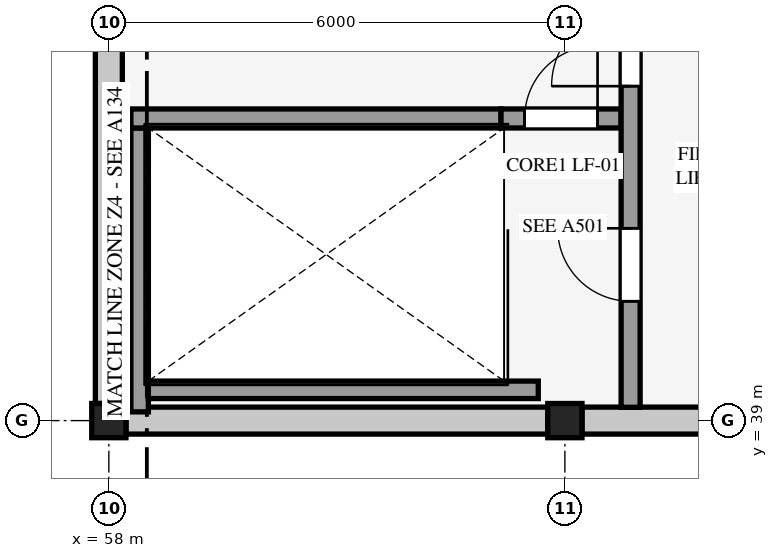
"""IFC4 building model, lengths in metres.
Left out: names, types, materials, properties, quantities, classifications, styles, units other than length and angle.
Written with IfcOpenShell. Run it as: python <this file> out.ifc"""

import sys

from ifc_helpers import new_model, si_unit, direction, frame, frame_2d, origin, origin_2d, place, context, subcontext, project, spatial, rectangle, extrude, element, fill, save


model = new_model("IFC4")
c1 = context("Model", 3, precision=1e-05, world=origin(), true_north=direction((0.0, 1.0)))
c2 = subcontext(c1, "Body", "Model", "MODEL_VIEW")
j1 = project(units=[si_unit("LENGTHUNIT", "METRE"), si_unit("PLANEANGLEUNIT", "RADIAN")], contexts=[c1])
p1 = place(None, origin())
s1 = spatial("IfcSite", under=j1, at=p1, CompositionType="ELEMENT")
p2 = place(p1, origin())
s2 = spatial("IfcBuilding", under=s1, at=p2, CompositionType="ELEMENT")
p3 = place(p2, frame((0.0, 0.0, 18.0)))
s3 = spatial("IfcBuildingStorey", under=s2, at=p3, CompositionType="ELEMENT", Elevation=18.0)
for number, where, z_axis, x_axis in (
    (1, (58.0, 39.0, 0.0), (0.0, 0.0, 1.0), (1.0, 0.0, 0.0)),
    (2, (64.0, 39.0, 0.0), (0.0, 0.0, 1.0), (1.0, 0.0, 0.0)),
):
    element("IfcColumn", number, at=place(p3, frame(where, z_axis=z_axis, x_axis=x_axis)), inside=s3, PredefinedType="COLUMN", context=c2, shape_type="SweptSolid", body=[
        extrude(rectangle(XDim=0.45, YDim=0.45, at=origin_2d()), origin(), (0.0, 0.0, 1.0), 4.5),
    ])
p4 = place(p3, frame((63.775, 39.0, 0.0), z_axis=(0.0, 0.0, 1.0), x_axis=(-1.0, 0.0, 0.0)))
e3 = element("IfcWall", 3, at=p4, inside=s3, PredefinedType="SOLIDWALL", context=c2, shape_type="SweptSolid", body=[
    extrude(rectangle(XDim=5.55, YDim=0.355, at=frame_2d((2.775, 0.0))), origin(), (0.0, 0.0, 1.0), 4.194),
])
p5 = place(p3, frame((69.775, 39.0, 0.0), z_axis=(0.0, 0.0, 1.0), x_axis=(-1.0, 0.0, 0.0)))
e4 = element("IfcWall", 4, at=p5, inside=s3, PredefinedType="SOLIDWALL", context=c2, shape_type="SweptSolid", body=[
    extrude(rectangle(XDim=5.55, YDim=0.355, at=frame_2d((2.775, 0.0))), origin(), (0.0, 0.0, 1.0), 4.234),
])
p6 = place(p3, frame((58.0, 39.225, 0.0), z_axis=(0.0, 0.0, 1.0), x_axis=(0.0, 1.0, 0.0)))
e5 = element("IfcWall", 5, at=p6, inside=s3, PredefinedType="SOLIDWALL", context=c2, shape_type="SweptSolid", body=[
    extrude(rectangle(XDim=5.55, YDim=0.355, at=frame_2d((2.775, 0.0))), origin(), (0.0, 0.0, 1.0), 4.093),
])
p7 = place(p3, frame((58.405, 39.115, 0.0), z_axis=(0.0, 0.0, 1.0), x_axis=(0.0, 1.0, 0.0)))
e6 = element("IfcWall", 6, at=p7, inside=s3, PredefinedType="SHEAR", context=c2, shape_type="SweptSolid", body=[
    extrude(rectangle(XDim=3.735, YDim=0.23, at=frame_2d((1.868, 0.0))), origin(), (0.0, 0.0, 1.0), 4.5),
])
p8 = place(p3, frame((58.52, 39.405, 0.0), z_axis=(0.0, 0.0, 1.0), x_axis=(1.0, 0.0, 0.0)))
e7 = element("IfcWall", 7, at=p8, inside=s3, PredefinedType="SHEAR", context=c2, shape_type="SweptSolid", body=[
    extrude(rectangle(XDim=5.13, YDim=0.23, at=frame_2d((2.565, 0.0))), origin(), (0.0, 0.0, 1.0), 4.5),
])
p9 = place(p3, frame((58.29, 42.975, 0.0), z_axis=(0.0, 0.0, 1.0), x_axis=(1.0, 0.0, 0.0)))
e8 = element("IfcWall", 8, at=p9, inside=s3, PredefinedType="SHEAR", context=c2, shape_type="SweptSolid", body=[
    extrude(rectangle(XDim=4.87, YDim=0.25, at=frame_2d((2.435, 0.0))), origin(), (0.0, 0.0, 1.0), 4.5),
])
p10 = place(p3, frame((63.16, 42.975, 0.0), z_axis=(0.0, 0.0, 1.0), x_axis=(1.0, 0.0, 0.0)))
e9 = element("IfcWall", 9, at=p10, inside=s3, PredefinedType="SHEAR", context=c2, shape_type="SweptSolid", body=[
    extrude(rectangle(XDim=1.58, YDim=0.25, at=frame_2d((0.79, 0.0))), origin(), (0.0, 0.0, 1.0), 4.24),
])
p11 = place(p10, frame((0.31, 0.0, 0.0)))
e10 = element("IfcOpeningElement", 10, at=p11, cuts=e9, PredefinedType="OPENING", context=c2, shape_type="SweptSolid", body=[
    extrude(rectangle(XDim=0.96, YDim=2.12, at=frame_2d((0.48, 1.06))), frame((0.0, 0.135, 0.0), z_axis=(0.0, -1.0, 0.0), x_axis=(1.0, 0.0, 0.0)), (0.0, 0.0, 1.0), 0.27),
])
p12 = place(p3, frame((64.865, 39.175, 0.0), z_axis=(0.0, 0.0, 1.0), x_axis=(0.0, 1.0, 0.0)))
e11 = element("IfcWall", 11, at=p12, inside=s3, PredefinedType="SHEAR", context=c2, shape_type="SweptSolid", body=[
    extrude(rectangle(XDim=5.688, YDim=0.25, at=frame_2d((2.844, 0.0))), origin(), (0.0, 0.0, 1.0), 4.24),
])
p13 = place(p12, frame((4.225, 0.0, 0.0)))
e12 = element("IfcOpeningElement", 12, at=p13, cuts=e11, PredefinedType="OPENING", context=c2, shape_type="SweptSolid", body=[
    extrude(rectangle(XDim=1.04, YDim=2.14, at=frame_2d((0.52, 1.07))), frame((0.0, 0.135, 0.0), z_axis=(0.0, -1.0, 0.0), x_axis=(1.0, 0.0, 0.0)), (0.0, 0.0, 1.0), 0.27),
])
p14 = place(p12, frame((1.395, 0.0, 0.0)))
e13 = element("IfcOpeningElement", 13, at=p14, cuts=e11, PredefinedType="OPENING", context=c2, shape_type="SweptSolid", body=[
    extrude(rectangle(XDim=0.96, YDim=2.12, at=frame_2d((0.48, 1.06))), frame((0.0, 0.135, 0.0), z_axis=(0.0, -1.0, 0.0), x_axis=(1.0, 0.0, 0.0)), (0.0, 0.0, 1.0), 0.27),
])
p15 = place(p11, origin())
e14 = element("IfcDoor", 14, at=p15, inside=s3, OperationType="SINGLE_SWING_RIGHT", PredefinedType="DOOR", context=c2, shape_type="SweptSolid", body=[
    extrude(rectangle(XDim=0.96, YDim=2.12, at=frame_2d((0.48, 1.06))), frame((0.0, 0.025, 0.0), z_axis=(0.0, -1.0, 0.0), x_axis=(1.0, 0.0, 0.0)), (0.0, 0.0, 1.0), 0.05),
])
fill(e10, e14)
p16 = place(p13, origin())
e15 = element("IfcDoor", 15, at=p16, inside=s3, OperationType="SINGLE_SWING_LEFT", PredefinedType="DOOR", context=c2, shape_type="SweptSolid", body=[
    extrude(rectangle(XDim=1.04, YDim=2.14, at=frame_2d((0.52, 1.07))), frame((0.0, 0.025, 0.0), z_axis=(0.0, -1.0, 0.0), x_axis=(1.0, 0.0, 0.0)), (0.0, 0.0, 1.0), 0.05),
])
fill(e12, e15)
p17 = place(p14, origin())
e16 = element("IfcDoor", 16, at=p17, inside=s3, OperationType="SINGLE_SWING_RIGHT", PredefinedType="DOOR", context=c2, shape_type="SweptSolid", body=[
    extrude(rectangle(XDim=0.96, YDim=2.12, at=frame_2d((0.48, 1.06))), frame((0.0, 0.025, 0.0), z_axis=(0.0, -1.0, 0.0), x_axis=(1.0, 0.0, 0.0)), (0.0, 0.0, 1.0), 0.05),
])
fill(e13, e16)
save(model, sys.argv[1])
